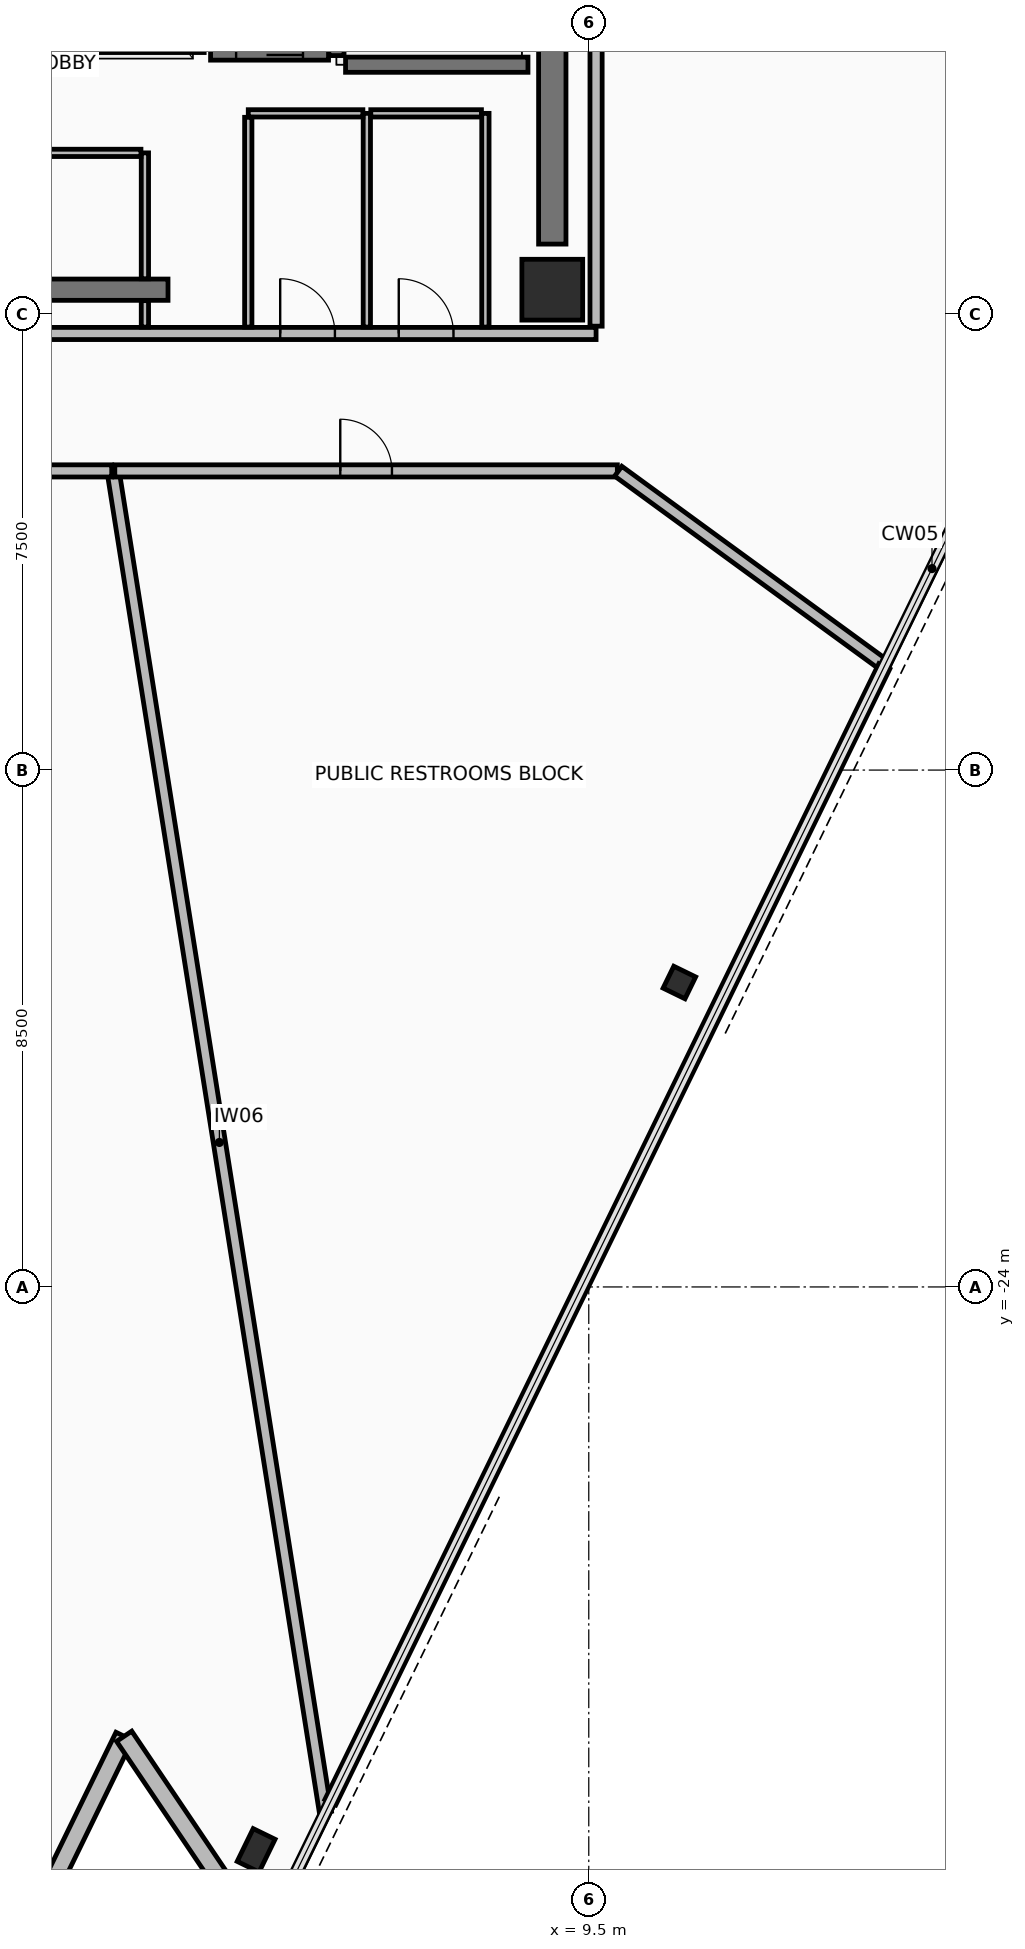
"""IFC4 building model, lengths in metres.
Left out: names, types, materials, properties, quantities, classifications, styles, units other than length and angle.
Written with IfcOpenShell. Run it as: python <this file> out.ifc"""

import sys

from ifc_helpers import new_model, si_unit, direction, frame, frame_2d, origin, origin_2d, place, context, subcontext, project, spatial, rectangle, hollow_rectangle, extrude, element, fill, save


model = new_model("IFC4")
c1 = context("Model", 3, precision=1e-05, world=origin(), true_north=direction((0.0, 1.0)))
c2 = subcontext(c1, "Body", "Model", "MODEL_VIEW")
j1 = project(units=[si_unit("LENGTHUNIT", "METRE"), si_unit("PLANEANGLEUNIT", "RADIAN")], contexts=[c1])
p1 = place(None, origin())
s1 = spatial("IfcSite", under=j1, at=p1, CompositionType="ELEMENT")
p2 = place(p1, origin())
s2 = spatial("IfcBuilding", under=s1, at=p2, CompositionType="ELEMENT")
p3 = place(p2, frame((0.0, 0.0, 267.8)))
s3 = spatial("IfcBuildingStorey", under=s2, at=p3, CompositionType="ELEMENT", Elevation=267.8)
p4 = place(p3, frame((8.9, -7.6, 0.0), z_axis=(0.0, 0.0, 1.0), x_axis=(1.0, 0.0, 0.0)))
e1 = element("IfcColumn", 1, at=p4, inside=s3, PredefinedType="COLUMN", context=c2, shape_type="SweptSolid", body=[
    extrude(rectangle(XDim=1.0, YDim=1.0, at=origin_2d()), origin(), (0.0, 0.0, 1.0), 3.6),
])
p5 = place(p3, frame((4.029, -33.265, 0.0), z_axis=(0.0, 0.0, 1.0), x_axis=(0.43837271548, 0.898793281196, 0.0)))
e2 = element("IfcColumn", 2, at=p5, inside=s3, PredefinedType="COLUMN", context=c2, shape_type="SweptSolid", body=[
    extrude(hollow_rectangle(XDim=0.4, YDim=0.6, WallThickness=0.03, at=origin_2d()), origin(), (0.0, 0.0, 1.0), 3.6),
])
p6 = place(p3, frame((10.99, -18.994, 0.0), z_axis=(0.0, 0.0, 1.0), x_axis=(0.43837271548, 0.898793281196, 0.0)))
e3 = element("IfcColumn", 3, at=p6, inside=s3, PredefinedType="COLUMN", context=c2, shape_type="SweptSolid", body=[
    extrude(hollow_rectangle(XDim=0.4, YDim=0.4, WallThickness=0.025, at=origin_2d()), origin(), (0.0, 0.0, 1.0), 3.6),
])
p7 = place(p3, frame((0.076, -35.045, 0.0), z_axis=(0.0, 0.0, 1.0), x_axis=(0.438357414153, 0.898800744024, 0.0)))
e4 = element("IfcWall", 4, at=p7, inside=s3, PredefinedType="STANDARD", context=c2, shape_type="SweptSolid", body=[
    extrude(rectangle(XDim=4.068, YDim=0.3, at=frame_2d((2.034, 0.0))), origin(), (0.0, 0.0, 1.0), 2.765),
])
p8 = place(p3, frame((1.859, -31.389, 0.0), z_axis=(0.0, 0.0, 1.0), x_axis=(0.559206900681, -0.829028131145, 0.0)))
e5 = element("IfcWall", 5, at=p8, inside=s3, PredefinedType="STANDARD", context=c2, shape_type="SweptSolid", body=[
    extrude(rectangle(XDim=4.068, YDim=0.3, at=frame_2d((2.034, 0.0))), origin(), (0.0, 0.0, 1.0), 2.765),
])
p9 = place(p3, frame((-2.8, -7.6, 0.0), z_axis=(0.0, 0.0, 1.0), x_axis=(1.0, 0.0, 0.0)))
e6 = element("IfcWall", 6, at=p9, inside=s3, PredefinedType="SHEAR", context=c2, shape_type="SweptSolid", body=[
    extrude(rectangle(XDim=5.38, YDim=0.35, at=frame_2d((2.69, 0.0))), origin(), (0.0, 0.0, 1.0), 3.42),
])
p10 = place(p3, frame((8.9, -6.85, 0.0), z_axis=(0.0, 0.0, 1.0), x_axis=(0.0, 1.0, 0.0)))
e7 = element("IfcWall", 7, at=p10, inside=s3, PredefinedType="SHEAR", context=c2, shape_type="SweptSolid", body=[
    extrude(rectangle(XDim=10.7, YDim=0.45, at=frame_2d((5.35, 0.0))), origin(), (0.0, 0.0, 1.0), 3.42),
])
p11 = place(p3, frame((-9.62, -8.32, 0.0), z_axis=(0.0, 0.0, 1.0), x_axis=(1.0, 0.0, 0.0)))
e8 = element("IfcWall", 8, at=p11, inside=s3, PredefinedType="PARTITIONING", context=c2, shape_type="SweptSolid", body=[
    extrude(rectangle(XDim=19.24, YDim=0.2, at=frame_2d((9.62, 0.0))), origin(), (0.0, 0.0, 1.0), 2.915),
])
p12 = place(p11, frame((8.57, 0.0, 0.0)))
e9 = element("IfcOpeningElement", 9, at=p12, cuts=e8, PredefinedType="OPENING", context=c2, shape_type="SweptSolid", body=[
    extrude(rectangle(XDim=0.9, YDim=2.1, at=frame_2d((0.45, 1.05))), frame((0.0, 0.11, 0.0), z_axis=(0.0, -1.0, 0.0), x_axis=(1.0, 0.0, 0.0)), (0.0, 0.0, 1.0), 0.22),
])
p13 = place(p11, frame((14.045, 0.0, 0.0)))
e10 = element("IfcOpeningElement", 10, at=p13, cuts=e8, PredefinedType="OPENING", context=c2, shape_type="SweptSolid", body=[
    extrude(rectangle(XDim=0.9, YDim=2.1, at=frame_2d((0.45, 1.05))), frame((0.0, 0.11, 0.0), z_axis=(0.0, -1.0, 0.0), x_axis=(1.0, 0.0, 0.0)), (0.0, 0.0, 1.0), 0.22),
])
p14 = place(p11, frame((15.995, 0.0, 0.0)))
e11 = element("IfcOpeningElement", 11, at=p14, cuts=e8, PredefinedType="OPENING", context=c2, shape_type="SweptSolid", body=[
    extrude(rectangle(XDim=0.9, YDim=2.1, at=frame_2d((0.45, 1.05))), frame((0.0, 0.11, 0.0), z_axis=(0.0, -1.0, 0.0), x_axis=(1.0, 0.0, 0.0)), (0.0, 0.0, 1.0), 0.22),
])
p15 = place(p3, frame((9.62, -8.2, 0.0), z_axis=(0.0, 0.0, 1.0), x_axis=(0.0, 1.0, 0.0)))
e12 = element("IfcWall", 12, at=p15, inside=s3, PredefinedType="PARTITIONING", context=c2, shape_type="SweptSolid", body=[
    extrude(rectangle(XDim=16.4, YDim=0.2, at=frame_2d((8.2, 0.0))), origin(), (0.0, 0.0, 1.0), 2.915),
])
p16 = place(p15, frame((12.65, 0.0, 0.0)))
e13 = element("IfcOpeningElement", 13, at=p16, cuts=e12, PredefinedType="OPENING", context=c2, shape_type="SweptSolid", body=[
    extrude(rectangle(XDim=1.1, YDim=2.15, at=frame_2d((0.55, 1.075))), frame((0.0, 0.11, 0.0), z_axis=(0.0, -1.0, 0.0), x_axis=(1.0, 0.0, 0.0)), (0.0, 0.0, 1.0), 0.22),
])
p17 = place(p3, frame((5.35, -3.75, 0.0), z_axis=(0.0, 0.0, 1.0), x_axis=(0.0, 1.0, 0.0)))
e14 = element("IfcWall", 14, at=p17, inside=s3, PredefinedType="SHEAR", context=c2, shape_type="SweptSolid", body=[
    extrude(rectangle(XDim=7.3, YDim=0.25, at=frame_2d((3.65, 0.0))), origin(), (0.0, 0.0, 1.0), 3.42),
])
p18 = place(p3, frame((5.5, -3.9, 0.0), z_axis=(0.0, 0.0, 1.0), x_axis=(1.0, 0.0, 0.0)))
e15 = element("IfcWall", 15, at=p18, inside=s3, PredefinedType="SHEAR", context=c2, shape_type="SweptSolid", body=[
    extrude(rectangle(XDim=3.0, YDim=0.25, at=frame_2d((1.5, 0.0))), origin(), (0.0, 0.0, 1.0), 3.42),
])
p19 = place(p3, frame((1.13, -3.6, 0.0), z_axis=(0.0, 0.0, 1.0), x_axis=(1.0, 0.0, 0.0)))
e16 = element("IfcWall", 16, at=p19, inside=s3, PredefinedType="PARTITIONING", context=c2, shape_type="SweptSolid", body=[
    extrude(rectangle(XDim=2.045, YDim=0.2, at=frame_2d((1.022, 0.0))), origin(), (0.0, 0.0, 1.0), 3.42),
])
p20 = place(p3, frame((3.28, -3.7, 0.0), z_axis=(0.0, 0.0, 1.0), x_axis=(1.0, 0.0, 0.0)))
e17 = element("IfcWall", 17, at=p20, inside=s3, PredefinedType="SHEAR", context=c2, shape_type="SweptSolid", body=[
    extrude(rectangle(XDim=1.94, YDim=0.25, at=frame_2d((0.97, 0.0))), origin(), (0.0, 0.0, 1.0), 3.42),
])
p21 = place(p20, frame((0.42, 0.0, 0.0)))
e18 = element("IfcOpeningElement", 18, at=p21, cuts=e17, PredefinedType="OPENING", context=c2, shape_type="SweptSolid", body=[
    extrude(rectangle(XDim=1.1, YDim=2.2, at=frame_2d((0.55, 1.1))), frame((0.0, 0.135, 0.0), z_axis=(0.0, -1.0, 0.0), x_axis=(1.0, 0.0, 0.0)), (0.0, 0.0, 1.0), 0.27),
])
p22 = place(p3, frame((2.2, -8.215, 0.0), z_axis=(0.0, 0.0, 1.0), x_axis=(0.0, 1.0, 0.0)))
e19 = element("IfcWall", 19, at=p22, inside=s3, PredefinedType="PARTITIONING", context=c2, shape_type="SweptSolid", body=[
    extrude(rectangle(XDim=0.435, YDim=0.12, at=frame_2d((0.218, 0.0))), origin(), (0.0, 0.0, 1.0), 2.715),
])
p23 = place(p3, frame((2.2, -7.42, 0.0), z_axis=(0.0, 0.0, 1.0), x_axis=(0.0, 1.0, 0.0)))
e20 = element("IfcWall", 20, at=p23, inside=s3, PredefinedType="PARTITIONING", context=c2, shape_type="SweptSolid", body=[
    extrude(rectangle(XDim=2.07, YDim=0.12, at=frame_2d((1.035, 0.0))), origin(), (0.0, 0.0, 1.0), 2.715),
])
p24 = place(p3, frame((2.135, -5.35, 0.0), z_axis=(0.0, 0.0, 1.0), x_axis=(-1.0, 0.0, 0.0)))
e21 = element("IfcWall", 21, at=p24, inside=s3, PredefinedType="PARTITIONING", context=c2, shape_type="SweptSolid", body=[
    extrude(rectangle(XDim=5.535, YDim=0.12, at=frame_2d((2.768, 0.0))), origin(), (0.0, 0.0, 1.0), 2.715),
])
p25 = place(p3, frame((5.85, -8.215, 0.0), z_axis=(0.0, 0.0, 1.0), x_axis=(0.0, 1.0, 0.0)))
e22 = element("IfcWall", 22, at=p25, inside=s3, PredefinedType="PARTITIONING", context=c2, shape_type="SweptSolid", body=[
    extrude(rectangle(XDim=3.515, YDim=0.12, at=frame_2d((1.758, 0.0))), origin(), (0.0, 0.0, 1.0), 2.715),
])
p26 = place(p3, frame((5.785, -4.7, 0.0), z_axis=(0.0, 0.0, 1.0), x_axis=(-1.0, 0.0, 0.0)))
e23 = element("IfcWall", 23, at=p26, inside=s3, PredefinedType="PARTITIONING", context=c2, shape_type="SweptSolid", body=[
    extrude(rectangle(XDim=1.885, YDim=0.12, at=frame_2d((0.942, 0.0))), origin(), (0.0, 0.0, 1.0), 3.42),
])
p27 = place(p3, frame((3.9, -4.765, 0.0), z_axis=(0.0, 0.0, 1.0), x_axis=(0.0, -1.0, 0.0)))
e24 = element("IfcWall", 24, at=p27, inside=s3, PredefinedType="PARTITIONING", context=c2, shape_type="SweptSolid", body=[
    extrude(rectangle(XDim=3.45, YDim=0.12, at=frame_2d((1.725, 0.0))), origin(), (0.0, 0.0, 1.0), 2.715),
])
p28 = place(p3, frame((7.8, -8.215, 0.0), z_axis=(0.0, 0.0, 1.0), x_axis=(0.0, 1.0, 0.0)))
e25 = element("IfcWall", 25, at=p28, inside=s3, PredefinedType="PARTITIONING", context=c2, shape_type="SweptSolid", body=[
    extrude(rectangle(XDim=3.515, YDim=0.12, at=frame_2d((1.758, 0.0))), origin(), (0.0, 0.0, 1.0), 2.715),
])
p29 = place(p3, frame((7.735, -4.7, 0.0), z_axis=(0.0, 0.0, 1.0), x_axis=(-1.0, 0.0, 0.0)))
e26 = element("IfcWall", 26, at=p29, inside=s3, PredefinedType="PARTITIONING", context=c2, shape_type="SweptSolid", body=[
    extrude(rectangle(XDim=1.82, YDim=0.12, at=frame_2d((0.91, 0.0))), origin(), (0.0, 0.0, 1.0), 3.42),
])
p30 = place(p3, frame((5.169, -32.639, 0.0), z_axis=(0.0, 0.0, 1.0), x_axis=(-0.156427400595, 0.987689459468, 0.0)))
e27 = element("IfcWall", 27, at=p30, inside=s3, PredefinedType="PARTITIONING", context=c2, shape_type="SweptSolid", body=[
    extrude(rectangle(XDim=22.304, YDim=0.2, at=frame_2d((11.152, 0.0))), origin(), (0.0, 0.0, 1.0), 2.765),
])
p31 = place(p3, frame((1.705, -10.58, 0.0), z_axis=(0.0, 0.0, 1.0), x_axis=(1.0, 0.0, 0.0)))
e28 = element("IfcWall", 28, at=p31, inside=s3, PredefinedType="PARTITIONING", context=c2, shape_type="SweptSolid", body=[
    extrude(rectangle(XDim=8.265, YDim=0.2, at=frame_2d((4.132, 0.0))), origin(), (0.0, 0.0, 1.0), 2.915),
])
p32 = place(p31, frame((3.708, 0.0, 0.0)))
e29 = element("IfcOpeningElement", 29, at=p32, cuts=e28, PredefinedType="OPENING", context=c2, shape_type="SweptSolid", body=[
    extrude(rectangle(XDim=0.85, YDim=2.1, at=frame_2d((0.425, 1.05))), frame((0.0, 0.11, 0.0), z_axis=(0.0, -1.0, 0.0), x_axis=(1.0, 0.0, 0.0)), (0.0, 0.0, 1.0), 0.22),
])
p33 = place(p3, frame((9.985, -10.585, 0.0), z_axis=(0.0, 0.0, 1.0), x_axis=(0.807837864592, -0.589404771386, 0.0)))
e30 = element("IfcWall", 30, at=p33, inside=s3, PredefinedType="PARTITIONING", context=c2, shape_type="SweptSolid", body=[
    extrude(rectangle(XDim=5.424, YDim=0.2, at=frame_2d((2.712, 0.0))), origin(), (0.0, 0.0, 1.0), 2.765),
])
p34 = place(p3, frame((14.361, -13.793, 0.0), z_axis=(0.0, 0.0, 1.0), x_axis=(-0.438372717421, -0.898793280249, 0.0)))
e31 = element("IfcWall", 31, at=p34, inside=s3, PredefinedType="PARTITIONING", context=c2, shape_type="SweptSolid", body=[
    extrude(rectangle(XDim=20.784, YDim=0.2, at=frame_2d((10.392, 0.0))), origin(), (0.0, 0.0, 1.0), 3.42),
])
p35 = place(p3, frame((-9.97, -10.58, 0.0), z_axis=(0.0, 0.0, 1.0), x_axis=(1.0, 0.0, 0.0)))
e32 = element("IfcWall", 32, at=p35, inside=s3, PredefinedType="PARTITIONING", context=c2, shape_type="SweptSolid", body=[
    extrude(rectangle(XDim=11.624, YDim=0.2, at=frame_2d((5.812, 0.0))), origin(), (0.0, 0.0, 1.0), 2.915),
])
p36 = place(p35, frame((5.362, 0.0, 0.0)))
e33 = element("IfcOpeningElement", 33, at=p36, cuts=e32, PredefinedType="OPENING", context=c2, shape_type="SweptSolid", body=[
    extrude(rectangle(XDim=0.9, YDim=2.1, at=frame_2d((0.45, 1.05))), frame((0.0, 0.11, 0.0), z_axis=(0.0, -1.0, 0.0), x_axis=(1.0, 0.0, 0.0)), (0.0, 0.0, 1.0), 0.22),
])
p37 = place(p3, frame((19.243, -3.74, 0.0), z_axis=(0.0, 0.0, 1.0), x_axis=(-0.98163067335, 0.190791040508, 0.0)))
e34 = element("IfcWall", 34, at=p37, inside=s3, PredefinedType="PARTITIONING", context=c2, shape_type="SweptSolid", body=[
    extrude(rectangle(XDim=7.481, YDim=0.2, at=frame_2d((3.74, 0.0))), origin(), (0.0, 0.0, 1.0), 2.765),
])
p38 = place(p21, origin())
e35 = element("IfcDoor", 35, at=p38, inside=s3, OperationType="SLIDING_TO_LEFT", PredefinedType="DOOR", context=c2, shape_type="SweptSolid", body=[
    extrude(rectangle(XDim=1.1, YDim=2.2, at=frame_2d((0.55, 1.1))), frame((0.0, 0.025, 0.0), z_axis=(0.0, -1.0, 0.0), x_axis=(1.0, 0.0, 0.0)), (0.0, 0.0, 1.0), 0.05),
])
fill(e18, e35)
p39 = place(p13, origin())
e36 = element("IfcDoor", 36, at=p39, inside=s3, OperationType="SINGLE_SWING_LEFT", PredefinedType="DOOR", context=c2, shape_type="SweptSolid", body=[
    extrude(rectangle(XDim=0.9, YDim=2.1, at=frame_2d((0.45, 1.05))), frame((0.0, 0.025, 0.0), z_axis=(0.0, -1.0, 0.0), x_axis=(1.0, 0.0, 0.0)), (0.0, 0.0, 1.0), 0.05),
])
fill(e10, e36)
p40 = place(p14, origin())
e37 = element("IfcDoor", 37, at=p40, inside=s3, OperationType="SINGLE_SWING_LEFT", PredefinedType="DOOR", context=c2, shape_type="SweptSolid", body=[
    extrude(rectangle(XDim=0.9, YDim=2.1, at=frame_2d((0.45, 1.05))), frame((0.0, 0.025, 0.0), z_axis=(0.0, -1.0, 0.0), x_axis=(1.0, 0.0, 0.0)), (0.0, 0.0, 1.0), 0.05),
])
fill(e11, e37)
p41 = place(p32, origin())
e38 = element("IfcDoor", 38, at=p41, inside=s3, OperationType="SINGLE_SWING_RIGHT", PredefinedType="DOOR", context=c2, shape_type="SweptSolid", body=[
    extrude(rectangle(XDim=0.85, YDim=2.1, at=frame_2d((0.425, 1.05))), frame((0.0, 0.025, 0.0), z_axis=(0.0, -1.0, 0.0), x_axis=(1.0, 0.0, 0.0)), (0.0, 0.0, 1.0), 0.05),
])
fill(e29, e38)
save(model, sys.argv[1])
